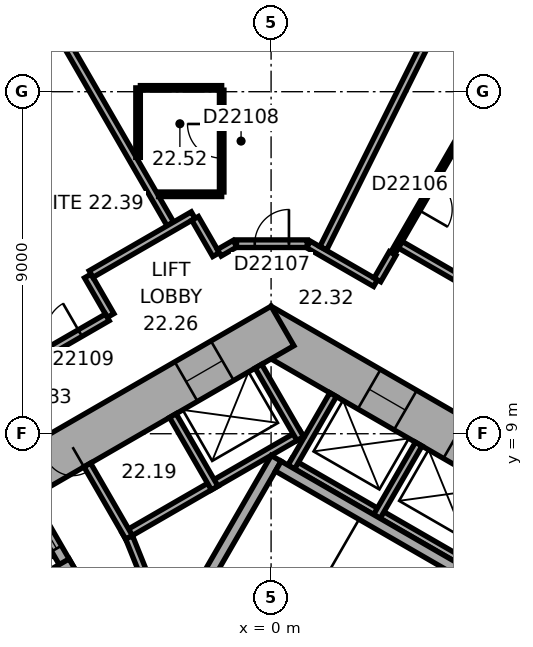
"""IFC4 building model, lengths in metres.
Left out: names, types, materials, properties, quantities, classifications, styles, units other than length and angle.
Written with IfcOpenShell. Run it as: python <this file> out.ifc"""

import sys

from ifc_helpers import new_model, si_unit, direction, frame, frame_2d, origin, place, context, subcontext, project, spatial, rectangle, extrude, element, fill, save


model = new_model("IFC4")
c1 = context("Model", 3, precision=1e-05, world=origin(), true_north=direction((0.0, 1.0)))
c2 = subcontext(c1, "Body", "Model", "MODEL_VIEW")
j1 = project(units=[si_unit("LENGTHUNIT", "METRE"), si_unit("PLANEANGLEUNIT", "RADIAN")], contexts=[c1])
p1 = place(None, origin())
s1 = spatial("IfcSite", under=j1, at=p1, CompositionType="ELEMENT")
p2 = place(p1, origin())
s2 = spatial("IfcBuilding", under=s1, at=p2, CompositionType="ELEMENT")
p3 = place(p2, frame((0.0, 0.0, 96.8)))
s3 = spatial("IfcBuildingStorey", under=s2, at=p3, CompositionType="ELEMENT", Elevation=96.8)
p4 = place(p3, frame((10.4, 5.658, 0.0), z_axis=(0.0, 0.0, 1.0), x_axis=(-0.866021384402, 0.500006961711, 0.0)))
e1 = element("IfcWall", 1, at=p4, inside=s3, PredefinedType="SHEAR", context=c2, shape_type="SweptSolid", body=[
    extrude(rectangle(XDim=12.355, YDim=1.2, at=frame_2d((6.178, 0.0))), origin(), (0.0, 0.0, 1.0), 3.3),
])
p5 = place(p4, frame((2.728, 0.0, 0.0)))
e2 = element("IfcOpeningElement", 2, at=p5, cuts=e1, PredefinedType="OPENING", context=c2, shape_type="SweptSolid", body=[
    extrude(rectangle(XDim=1.1, YDim=2.1, at=frame_2d((0.55, 1.05))), frame((0.0, 0.61, 0.0), z_axis=(0.0, -1.0, 0.0), x_axis=(1.0, 0.0, 0.0)), (0.0, 0.0, 1.0), 1.22),
])
p6 = place(p4, frame((5.328, 0.0, 0.0)))
e3 = element("IfcOpeningElement", 3, at=p6, cuts=e1, PredefinedType="OPENING", context=c2, shape_type="SweptSolid", body=[
    extrude(rectangle(XDim=1.1, YDim=2.1, at=frame_2d((0.55, 1.05))), frame((0.0, 0.61, 0.0), z_axis=(0.0, -1.0, 0.0), x_axis=(1.0, 0.0, 0.0)), (0.0, 0.0, 1.0), 1.22),
])
p7 = place(p4, frame((7.928, 0.0, 0.0)))
e4 = element("IfcOpeningElement", 4, at=p7, cuts=e1, PredefinedType="OPENING", context=c2, shape_type="SweptSolid", body=[
    extrude(rectangle(XDim=1.1, YDim=2.1, at=frame_2d((0.55, 1.05))), frame((0.0, 0.61, 0.0), z_axis=(0.0, -1.0, 0.0), x_axis=(1.0, 0.0, 0.0)), (0.0, 0.0, 1.0), 1.22),
])
p8 = place(p3, frame((0.3, 11.836, 0.0), z_axis=(0.0, 0.0, 1.0), x_axis=(-0.866021384402, -0.500006961711, 0.0)))
e5 = element("IfcWall", 5, at=p8, inside=s3, PredefinedType="SHEAR", context=c2, shape_type="SweptSolid", body=[
    extrude(rectangle(XDim=12.355, YDim=1.2, at=frame_2d((6.178, 0.0))), origin(), (0.0, 0.0, 1.0), 3.3),
])
p9 = place(p8, frame((6.378, 0.0, 0.0)))
e6 = element("IfcOpeningElement", 6, at=p9, cuts=e5, PredefinedType="OPENING", context=c2, shape_type="SweptSolid", body=[
    extrude(rectangle(XDim=1.5, YDim=2.1, at=frame_2d((0.75, 1.05))), frame((0.0, 0.61, 0.0), z_axis=(0.0, -1.0, 0.0), x_axis=(1.0, 0.0, 0.0)), (0.0, 0.0, 1.0), 1.22),
])
p10 = place(p8, frame((1.828, 0.0, 0.0)))
e7 = element("IfcOpeningElement", 7, at=p10, cuts=e5, PredefinedType="OPENING", context=c2, shape_type="SweptSolid", body=[
    extrude(rectangle(XDim=1.1, YDim=2.1, at=frame_2d((0.55, 1.05))), frame((0.0, 0.61, 0.0), z_axis=(0.0, -1.0, 0.0), x_axis=(1.0, 0.0, 0.0)), (0.0, 0.0, 1.0), 1.22),
])
p11 = place(p3, frame((20.63, 15.47, 0.0), z_axis=(0.0, 0.0, 1.0), x_axis=(-0.894934518609, 0.446197498203, 0.0)))
e8 = element("IfcWall", 8, at=p11, inside=s3, PredefinedType="STANDARD", context=c2, shape_type="SweptSolid", body=[
    extrude(rectangle(XDim=21.246, YDim=0.2, at=frame_2d((10.623, 0.0))), origin(), (0.0, 0.0, 1.0), 3.3),
])
p12 = place(p11, frame((1.553, 0.0, 0.8)))
e9 = element("IfcOpeningElement", 9, at=p12, cuts=e8, PredefinedType="OPENING", context=c2, shape_type="SweptSolid", body=[
    extrude(rectangle(XDim=2.4, YDim=1.7, at=frame_2d((1.2, 0.85))), frame((0.0, 0.11, 0.0), z_axis=(0.0, -1.0, 0.0), x_axis=(1.0, 0.0, 0.0)), (0.0, 0.0, 1.0), 0.22),
])
p13 = place(p11, frame((5.488, 0.0, 0.8)))
e10 = element("IfcOpeningElement", 10, at=p13, cuts=e8, PredefinedType="OPENING", context=c2, shape_type="SweptSolid", body=[
    extrude(rectangle(XDim=2.4, YDim=1.7, at=frame_2d((1.2, 0.85))), frame((0.0, 0.11, 0.0), z_axis=(0.0, -1.0, 0.0), x_axis=(1.0, 0.0, 0.0)), (0.0, 0.0, 1.0), 0.22),
])
p14 = place(p11, frame((9.422, 0.0, 0.8)))
e11 = element("IfcOpeningElement", 11, at=p14, cuts=e8, PredefinedType="OPENING", context=c2, shape_type="SweptSolid", body=[
    extrude(rectangle(XDim=2.4, YDim=1.7, at=frame_2d((1.2, 0.85))), frame((0.0, 0.11, 0.0), z_axis=(0.0, -1.0, 0.0), x_axis=(1.0, 0.0, 0.0)), (0.0, 0.0, 1.0), 0.22),
])
p15 = place(p11, frame((13.357, 0.0, 0.8)))
e12 = element("IfcOpeningElement", 12, at=p15, cuts=e8, PredefinedType="OPENING", context=c2, shape_type="SweptSolid", body=[
    extrude(rectangle(XDim=2.4, YDim=1.7, at=frame_2d((1.2, 0.85))), frame((0.0, 0.11, 0.0), z_axis=(0.0, -1.0, 0.0), x_axis=(1.0, 0.0, 0.0)), (0.0, 0.0, 1.0), 0.22),
])
p16 = place(p11, frame((17.292, 0.0, 0.8)))
e13 = element("IfcOpeningElement", 13, at=p16, cuts=e8, PredefinedType="OPENING", context=c2, shape_type="SweptSolid", body=[
    extrude(rectangle(XDim=2.4, YDim=1.7, at=frame_2d((1.2, 0.85))), frame((0.0, 0.11, 0.0), z_axis=(0.0, -1.0, 0.0), x_axis=(1.0, 0.0, 0.0)), (0.0, 0.0, 1.0), 0.22),
])
p17 = place(p3, frame((-3.136, 24.805, 0.0), z_axis=(0.0, 0.0, 1.0), x_axis=(-0.866028291626, -0.499994998079, 0.0)))
e14 = element("IfcWall", 14, at=p17, inside=s3, PredefinedType="STANDARD", context=c2, shape_type="SweptSolid", body=[
    extrude(rectangle(XDim=21.246, YDim=0.2, at=frame_2d((10.623, 0.0))), origin(), (0.0, 0.0, 1.0), 3.3),
])
p18 = place(p17, frame((1.555, 0.0, 0.8)))
e15 = element("IfcOpeningElement", 15, at=p18, cuts=e14, PredefinedType="OPENING", context=c2, shape_type="SweptSolid", body=[
    extrude(rectangle(XDim=2.4, YDim=1.7, at=frame_2d((1.2, 0.85))), frame((0.0, 0.11, 0.0), z_axis=(0.0, -1.0, 0.0), x_axis=(1.0, 0.0, 0.0)), (0.0, 0.0, 1.0), 0.22),
])
p19 = place(p17, frame((5.489, 0.0, 0.8)))
e16 = element("IfcOpeningElement", 16, at=p19, cuts=e14, PredefinedType="OPENING", context=c2, shape_type="SweptSolid", body=[
    extrude(rectangle(XDim=2.4, YDim=1.7, at=frame_2d((1.2, 0.85))), frame((0.0, 0.11, 0.0), z_axis=(0.0, -1.0, 0.0), x_axis=(1.0, 0.0, 0.0)), (0.0, 0.0, 1.0), 0.22),
])
p20 = place(p17, frame((9.424, 0.0, 0.8)))
e17 = element("IfcOpeningElement", 17, at=p20, cuts=e14, PredefinedType="OPENING", context=c2, shape_type="SweptSolid", body=[
    extrude(rectangle(XDim=2.4, YDim=1.7, at=frame_2d((1.2, 0.85))), frame((0.0, 0.11, 0.0), z_axis=(0.0, -1.0, 0.0), x_axis=(1.0, 0.0, 0.0)), (0.0, 0.0, 1.0), 0.22),
])
p21 = place(p17, frame((13.358, 0.0, 0.8)))
e18 = element("IfcOpeningElement", 18, at=p21, cuts=e14, PredefinedType="OPENING", context=c2, shape_type="SweptSolid", body=[
    extrude(rectangle(XDim=2.4, YDim=1.7, at=frame_2d((1.2, 0.85))), frame((0.0, 0.11, 0.0), z_axis=(0.0, -1.0, 0.0), x_axis=(1.0, 0.0, 0.0)), (0.0, 0.0, 1.0), 0.22),
])
p22 = place(p17, frame((17.293, 0.0, 0.8)))
e19 = element("IfcOpeningElement", 19, at=p22, cuts=e14, PredefinedType="OPENING", context=c2, shape_type="SweptSolid", body=[
    extrude(rectangle(XDim=2.4, YDim=1.7, at=frame_2d((1.2, 0.85))), frame((0.0, 0.11, 0.0), z_axis=(0.0, -1.0, 0.0), x_axis=(1.0, 0.0, 0.0)), (0.0, 0.0, 1.0), 0.22),
])
p23 = place(p3, frame((7.424, 4.259, 0.0), z_axis=(0.0, 0.0, 1.0), x_axis=(-0.866026010844, 0.49999894854, 0.0)))
e20 = element("IfcWall", 20, at=p23, inside=s3, PredefinedType="PARTITIONING", context=c2, shape_type="SweptSolid", body=[
    extrude(rectangle(XDim=8.0, YDim=0.2, at=frame_2d((4.0, 0.0))), origin(), (0.0, 0.0, 1.0), 3.05),
])
for number, where, z_axis, x_axis in (
    (21, (2.784, 6.822, 0.0), (0.0, 0.0, 1.0), (0.5, 0.866, 0.0)),
    (22, (0.532, 8.122, 0.0), (0.0, 0.0, 1.0), (0.5, 0.866, 0.0)),
):
    element("IfcWall", number, at=place(p3, frame(where, z_axis=z_axis, x_axis=x_axis)), inside=s3, PredefinedType="PARTITIONING", context=c2, shape_type="SweptSolid", body=[
        extrude(rectangle(XDim=2.2, YDim=0.2, at=frame_2d((1.1, 0.0))), origin(), (0.0, 0.0, 1.0), 3.05),
    ])
p24 = place(p3, frame((0.803, 9.009, 0.0), z_axis=(0.0, 0.0, 1.0), x_axis=(-0.866028230842, -0.499995103361, 0.0)))
e23 = element("IfcWall", 23, at=p24, inside=s3, PredefinedType="PARTITIONING", context=c2, shape_type="SweptSolid", body=[
    extrude(rectangle(XDim=5.4, YDim=0.2, at=frame_2d((2.7, 0.0))), origin(), (0.0, 0.0, 1.0), 3.05),
])
p25 = place(p3, frame((0.767, 8.872, 0.0), z_axis=(0.0, 0.0, 1.0), x_axis=(-0.499994660107, 0.866028486751, 0.0)))
e24 = element("IfcWall", 24, at=p25, inside=s3, PredefinedType="PARTITIONING", context=c2, shape_type="SweptSolid", body=[
    extrude(rectangle(XDim=2.2, YDim=0.2, at=frame_2d((1.1, 0.0))), origin(), (0.0, 0.0, 1.0), 3.05),
])
for number, where, z_axis, x_axis in (
    (25, (-1.485, 7.572, 0.0), (0.0, 0.0, 1.0), (-0.5, 0.866, 0.0)),
    (26, (-3.737, 6.272, 0.0), (0.0, 0.0, 1.0), (-0.5, 0.866, 0.0)),
):
    element("IfcWall", number, at=place(p3, frame(where, z_axis=z_axis, x_axis=x_axis)), inside=s3, PredefinedType="PARTITIONING", context=c2, shape_type="SweptSolid", body=[
        extrude(rectangle(XDim=2.2, YDim=0.2, at=frame_2d((1.1, 0.0))), origin(), (0.0, 0.0, 1.0), 3.05),
    ])
p26 = place(p3, frame((-2.216, 4.282, 0.0), z_axis=(0.0, 0.0, 1.0), x_axis=(0.499977259774, 0.866038532462, 0.0)))
e27 = element("IfcWall", 27, at=p26, inside=s3, PredefinedType="SHEAR", context=c2, shape_type="SweptSolid", body=[
    extrude(rectangle(XDim=4.7, YDim=0.3, at=frame_2d((2.35, 0.0))), origin(), (0.0, 0.0, 1.0), 3.05),
])
p27 = place(p3, frame((6.303, 4.617, 0.0), z_axis=(0.0, 0.0, 1.0), x_axis=(-0.866027801685, 0.499995846692, 0.0)))
e28 = element("IfcWall", 28, at=p27, inside=s3, PredefinedType="SHEAR", context=c2, shape_type="SweptSolid", body=[
    extrude(rectangle(XDim=7.06, YDim=0.3, at=frame_2d((3.53, 0.0))), origin(), (0.0, 0.0, 1.0), 3.05),
])
p28 = place(p3, frame((-5.295, 5.372, 0.0), z_axis=(0.0, 0.0, 1.0), x_axis=(-0.500077893725, 0.86598042715, 0.0)))
e29 = element("IfcWall", 29, at=p28, inside=s3, PredefinedType="SHEAR", context=c2, shape_type="SweptSolid", body=[
    extrude(rectangle(XDim=2.2, YDim=0.3, at=frame_2d((1.1, 0.0))), origin(), (0.0, 0.0, 1.0), 3.05),
])
p29 = place(p28, frame((0.7, 0.0, 0.0)))
e30 = element("IfcOpeningElement", 30, at=p29, cuts=e29, PredefinedType="OPENING", context=c2, shape_type="SweptSolid", body=[
    extrude(rectangle(XDim=1.1, YDim=2.1, at=frame_2d((0.55, 1.05))), frame((0.0, 0.16, 0.0), z_axis=(0.0, -1.0, 0.0), x_axis=(1.0, 0.0, 0.0)), (0.0, 0.0, 1.0), 0.32),
])
p30 = place(p3, frame((-5.24, 5.577, 0.0), z_axis=(0.0, 0.0, 1.0), x_axis=(-0.866014461049, -0.500018952895, 0.0)))
e31 = element("IfcWall", 31, at=p30, inside=s3, PredefinedType="SHEAR", context=c2, shape_type="SweptSolid", body=[
    extrude(rectangle(XDim=3.35, YDim=0.3, at=frame_2d((1.675, 0.0))), origin(), (0.0, 0.0, 1.0), 3.05),
])
p31 = place(p3, frame((-2.615, 3.487, 0.0), z_axis=(0.0, 0.0, 1.0), x_axis=(-0.373576831041, 0.92759924068, 0.0)))
e32 = element("IfcWall", 32, at=p31, inside=s3, PredefinedType="PARTITIONING", context=c2, shape_type="SweptSolid", body=[
    extrude(rectangle(XDim=3.002, YDim=0.2, at=frame_2d((1.501, 0.0))), origin(), (0.0, 0.0, 1.0), 3.05),
])
p32 = place(p31, frame((1.15, 0.0, 0.0)))
e33 = element("IfcOpeningElement", 33, at=p32, cuts=e32, PredefinedType="OPENING", context=c2, shape_type="SweptSolid", body=[
    extrude(rectangle(XDim=0.9, YDim=2.1, at=frame_2d((0.45, 1.05))), frame((0.0, 0.11, 0.0), z_axis=(0.0, -1.0, 0.0), x_axis=(1.0, 0.0, 0.0)), (0.0, 0.0, 1.0), 0.22),
])
p33 = place(p3, frame((-6.676, 21.492, 0.0), z_axis=(0.0, 0.0, 1.0), x_axis=(0.500011263043, -0.866018900966, 0.0)))
e34 = element("IfcWall", 34, at=p33, inside=s3, PredefinedType="PARTITIONING", context=c2, shape_type="SweptSolid", body=[
    extrude(rectangle(XDim=8.049, YDim=0.2, at=frame_2d((4.024, 0.0))), origin(), (0.0, 0.0, 1.0), 3.05),
])
p34 = place(p3, frame((-4.823, 13.152, 0.0), z_axis=(0.0, 0.0, 1.0), x_axis=(0.499986357472, -0.866033280158, 0.0)))
e35 = element("IfcWall", 35, at=p34, inside=s3, PredefinedType="PARTITIONING", context=c2, shape_type="SweptSolid", body=[
    extrude(rectangle(XDim=1.201, YDim=0.2, at=frame_2d((0.601, 0.0))), origin(), (0.0, 0.0, 1.0), 3.05),
])
p35 = place(p3, frame((-4.309, 12.061, 0.0), z_axis=(0.0, 0.0, 1.0), x_axis=(-0.866020679205, -0.500008183122, 0.0)))
e36 = element("IfcWall", 36, at=p35, inside=s3, PredefinedType="PARTITIONING", context=c2, shape_type="SweptSolid", body=[
    extrude(rectangle(XDim=5.104, YDim=0.2, at=frame_2d((2.552, 0.0))), origin(), (0.0, 0.0, 1.0), 3.05),
])
p36 = place(p35, frame((0.827, 0.0, 0.0)))
e37 = element("IfcOpeningElement", 37, at=p36, cuts=e36, PredefinedType="OPENING", context=c2, shape_type="SweptSolid", body=[
    extrude(rectangle(XDim=0.9, YDim=2.1, at=frame_2d((0.45, 1.05))), frame((0.0, 0.11, 0.0), z_axis=(0.0, -1.0, 0.0), x_axis=(1.0, 0.0, 0.0)), (0.0, 0.0, 1.0), 0.22),
])
p37 = place(p3, frame((-3.5, 16.271, 0.0), z_axis=(0.0, 0.0, 1.0), x_axis=(0.0, 1.0, 0.0)))
e38 = element("IfcWall", 38, at=p37, inside=s3, PredefinedType="PARTITIONING", context=c2, shape_type="SweptSolid", body=[
    extrude(rectangle(XDim=1.829, YDim=0.12, at=frame_2d((0.915, 0.0))), origin(), (0.0, 0.0, 1.0), 3.05),
])
p38 = place(p3, frame((-3.44, 18.101, 0.0), z_axis=(0.0, 0.0, 1.0), x_axis=(1.0, 0.0, 0.0)))
e39 = element("IfcWall", 39, at=p38, inside=s3, PredefinedType="PARTITIONING", context=c2, shape_type="SweptSolid", body=[
    extrude(rectangle(XDim=2.14, YDim=0.12, at=frame_2d((1.07, 0.0))), origin(), (0.0, 0.0, 1.0), 3.05),
])
p39 = place(p3, frame((-2.05, 14.752, 0.0), z_axis=(0.0, 0.0, 1.0), x_axis=(-0.866030936828, -0.499990416364, 0.0)))
e40 = element("IfcWall", 40, at=p39, inside=s3, PredefinedType="PARTITIONING", context=c2, shape_type="SweptSolid", body=[
    extrude(rectangle(XDim=3.102, YDim=0.2, at=frame_2d((1.551, 0.0))), origin(), (0.0, 0.0, 1.0), 3.05),
])
p40 = place(p3, frame((-1.449, 13.712, 0.0), z_axis=(0.0, 0.0, 1.0), x_axis=(-0.499978356969, 0.866037899034, 0.0)))
e41 = element("IfcWall", 41, at=p40, inside=s3, PredefinedType="PARTITIONING", context=c2, shape_type="SweptSolid", body=[
    extrude(rectangle(XDim=1.101, YDim=0.2, at=frame_2d((0.551, 0.0))), origin(), (0.0, 0.0, 1.0), 3.05),
])
p41 = place(p3, frame((-1.3, 15.301, 0.0), z_axis=(0.0, 0.0, 1.0), x_axis=(-1.0, 0.0, 0.0)))
e42 = element("IfcWall", 42, at=p41, inside=s3, PredefinedType="PARTITIONING", context=c2, shape_type="SweptSolid", body=[
    extrude(rectangle(XDim=1.661, YDim=0.12, at=frame_2d((0.831, 0.0))), origin(), (0.0, 0.0, 1.0), 3.05),
])
p42 = place(p3, frame((-1.3, 18.041, 0.0), z_axis=(0.0, 0.0, 1.0), x_axis=(0.0, -1.0, 0.0)))
e43 = element("IfcWall", 43, at=p42, inside=s3, PredefinedType="PARTITIONING", context=c2, shape_type="SweptSolid", body=[
    extrude(rectangle(XDim=2.68, YDim=0.12, at=frame_2d((1.34, 0.0))), origin(), (0.0, 0.0, 1.0), 3.05),
])
p43 = place(p42, frame((0.89, 0.0, 0.0)))
e44 = element("IfcOpeningElement", 44, at=p43, cuts=e43, PredefinedType="OPENING", context=c2, shape_type="SweptSolid", body=[
    extrude(rectangle(XDim=0.9, YDim=2.1, at=frame_2d((0.45, 1.05))), frame((0.0, 0.07, 0.0), z_axis=(0.0, -1.0, 0.0), x_axis=(1.0, 0.0, 0.0)), (0.0, 0.0, 1.0), 0.14),
])
p44 = place(p3, frame((-0.95, 14.001, 0.0), z_axis=(0.0, 0.0, 1.0), x_axis=(-0.86609177584, -0.499885022602, 0.0)))
e45 = element("IfcWall", 45, at=p44, inside=s3, PredefinedType="PARTITIONING", context=c2, shape_type="SweptSolid", body=[
    extrude(rectangle(XDim=0.477, YDim=0.2, at=frame_2d((0.238, 0.0))), origin(), (0.0, 0.0, 1.0), 3.05),
])
p45 = place(p3, frame((0.95, 14.001, 0.0), z_axis=(0.0, 0.0, 1.0), x_axis=(-1.0, 0.0, 0.0)))
e46 = element("IfcWall", 46, at=p45, inside=s3, PredefinedType="PARTITIONING", context=c2, shape_type="SweptSolid", body=[
    extrude(rectangle(XDim=1.86, YDim=0.2, at=frame_2d((0.93, 0.0))), origin(), (0.0, 0.0, 1.0), 3.05),
])
p46 = place(p45, frame((0.48, 0.0, 0.0)))
e47 = element("IfcOpeningElement", 47, at=p46, cuts=e46, PredefinedType="OPENING", context=c2, shape_type="SweptSolid", body=[
    extrude(rectangle(XDim=0.9, YDim=2.1, at=frame_2d((0.45, 1.05))), frame((0.0, 0.11, 0.0), z_axis=(0.0, -1.0, 0.0), x_axis=(1.0, 0.0, 0.0)), (0.0, 0.0, 1.0), 0.22),
])
p47 = place(p3, frame((2.748, 12.962, 0.0), z_axis=(0.0, 0.0, 1.0), x_axis=(-0.866013897511, 0.50001992892, 0.0)))
e48 = element("IfcWall", 48, at=p47, inside=s3, PredefinedType="PARTITIONING", context=c2, shape_type="SweptSolid", body=[
    extrude(rectangle(XDim=2.037, YDim=0.2, at=frame_2d((1.018, 0.0))), origin(), (0.0, 0.0, 1.0), 3.05),
])
p48 = place(p3, frame((3.199, 13.743, 0.0), z_axis=(0.0, 0.0, 1.0), x_axis=(-0.500170954823, -0.865926680471, 0.0)))
e49 = element("IfcWall", 49, at=p48, inside=s3, PredefinedType="PARTITIONING", context=c2, shape_type="SweptSolid", body=[
    extrude(rectangle(XDim=0.801, YDim=0.2, at=frame_2d((0.4, 0.0))), origin(), (0.0, 0.0, 1.0), 3.05),
])
p49 = place(p3, frame((3.232, 13.8, 0.0), z_axis=(0.0, 0.0, 1.0), x_axis=(0.499993265928, 0.866029291668, 0.0)))
e50 = element("IfcWall", 50, at=p49, inside=s3, PredefinedType="PARTITIONING", context=c2, shape_type="SweptSolid", body=[
    extrude(rectangle(XDim=3.434, YDim=0.12, at=frame_2d((1.717, 0.0))), origin(), (0.0, 0.0, 1.0), 3.05),
])
p50 = place(p49, frame((1.267, 0.0, 0.0)))
e51 = element("IfcOpeningElement", 51, at=p50, cuts=e50, PredefinedType="OPENING", context=c2, shape_type="SweptSolid", body=[
    extrude(rectangle(XDim=0.9, YDim=2.1, at=frame_2d((0.45, 1.05))), frame((0.0, 0.07, 0.0), z_axis=(0.0, -1.0, 0.0), x_axis=(1.0, 0.0, 0.0)), (0.0, 0.0, 1.0), 0.14),
])
p51 = place(p3, frame((5.351, 21.859, 0.0), z_axis=(0.0, 0.0, 1.0), x_axis=(-0.446205309328, -0.894930624086, 0.0)))
e52 = element("IfcWall", 52, at=p51, inside=s3, PredefinedType="PARTITIONING", context=c2, shape_type="SweptSolid", body=[
    extrude(rectangle(XDim=8.913, YDim=0.2, at=frame_2d((4.457, 0.0))), origin(), (0.0, 0.0, 1.0), 2.6),
])
p52 = place(p3, frame((10.885, 9.652, 0.0), z_axis=(0.0, 0.0, 1.0), x_axis=(-0.866033630405, 0.499985750804, 0.0)))
e53 = element("IfcWall", 53, at=p52, inside=s3, PredefinedType="PARTITIONING", context=c2, shape_type="SweptSolid", body=[
    extrude(rectangle(XDim=8.642, YDim=0.2, at=frame_2d((4.321, 0.0))), origin(), (0.0, 0.0, 1.0), 3.05),
])
p53 = place(p52, frame((2.276, 0.0, 0.0)))
e54 = element("IfcOpeningElement", 54, at=p53, cuts=e53, PredefinedType="OPENING", context=c2, shape_type="SweptSolid", body=[
    extrude(rectangle(XDim=0.9, YDim=2.1, at=frame_2d((0.45, 1.05))), frame((0.0, 0.11, 0.0), z_axis=(0.0, -1.0, 0.0), x_axis=(1.0, 0.0, 0.0)), (0.0, 0.0, 1.0), 0.22),
])
p54 = place(p9, origin())
e55 = element("IfcDoor", 55, at=p54, inside=s3, OperationType="DOUBLE_DOOR_SINGLE_SWING", PredefinedType="DOOR", context=c2, shape_type="SweptSolid", body=[
    extrude(rectangle(XDim=1.5, YDim=2.1, at=frame_2d((0.75, 1.05))), frame((0.0, 0.025, 0.0), z_axis=(0.0, -1.0, 0.0), x_axis=(1.0, 0.0, 0.0)), (0.0, 0.0, 1.0), 0.05),
])
fill(e6, e55)
p55 = place(p29, origin())
e56 = element("IfcDoor", 56, at=p55, inside=s3, OperationType="DOUBLE_DOOR_SLIDING", PredefinedType="DOOR", context=c2, shape_type="SweptSolid", body=[
    extrude(rectangle(XDim=1.1, YDim=2.1, at=frame_2d((0.55, 1.05))), frame((0.0, 0.025, 0.0), z_axis=(0.0, -1.0, 0.0), x_axis=(1.0, 0.0, 0.0)), (0.0, 0.0, 1.0), 0.05),
])
fill(e30, e56)
p56 = place(p7, origin())
e57 = element("IfcDoor", 57, at=p56, inside=s3, OperationType="DOUBLE_DOOR_SLIDING", PredefinedType="DOOR", context=c2, shape_type="SweptSolid", body=[
    extrude(rectangle(XDim=1.1, YDim=2.1, at=frame_2d((0.55, 1.05))), frame((0.0, 0.025, 0.0), z_axis=(0.0, -1.0, 0.0), x_axis=(1.0, 0.0, 0.0)), (0.0, 0.0, 1.0), 0.05),
])
fill(e4, e57)
p57 = place(p10, origin())
e58 = element("IfcDoor", 58, at=p57, inside=s3, OperationType="DOUBLE_DOOR_SLIDING", PredefinedType="DOOR", context=c2, shape_type="SweptSolid", body=[
    extrude(rectangle(XDim=1.1, YDim=2.1, at=frame_2d((0.55, 1.05))), frame((0.0, 0.025, 0.0), z_axis=(0.0, -1.0, 0.0), x_axis=(1.0, 0.0, 0.0)), (0.0, 0.0, 1.0), 0.05),
])
fill(e7, e58)
p58 = place(p50, origin())
e59 = element("IfcDoor", 59, at=p58, inside=s3, OperationType="SINGLE_SWING_LEFT", PredefinedType="DOOR", context=c2, shape_type="SweptSolid", body=[
    extrude(rectangle(XDim=0.9, YDim=2.1, at=frame_2d((0.45, 1.05))), frame((0.0, 0.025, 0.0), z_axis=(0.0, -1.0, 0.0), x_axis=(1.0, 0.0, 0.0)), (0.0, 0.0, 1.0), 0.05),
])
fill(e51, e59)
p59 = place(p46, origin())
e60 = element("IfcDoor", 60, at=p59, inside=s3, OperationType="SINGLE_SWING_LEFT", PredefinedType="DOOR", context=c2, shape_type="SweptSolid", body=[
    extrude(rectangle(XDim=0.9, YDim=2.1, at=frame_2d((0.45, 1.05))), frame((0.0, 0.025, 0.0), z_axis=(0.0, -1.0, 0.0), x_axis=(1.0, 0.0, 0.0)), (0.0, 0.0, 1.0), 0.05),
])
fill(e47, e60)
p60 = place(p43, origin())
e61 = element("IfcDoor", 61, at=p60, inside=s3, OperationType="SINGLE_SWING_LEFT", PredefinedType="DOOR", context=c2, shape_type="SweptSolid", body=[
    extrude(rectangle(XDim=0.9, YDim=2.1, at=frame_2d((0.45, 1.05))), frame((0.0, 0.025, 0.0), z_axis=(0.0, -1.0, 0.0), x_axis=(1.0, 0.0, 0.0)), (0.0, 0.0, 1.0), 0.05),
])
fill(e44, e61)
p61 = place(p36, origin())
e62 = element("IfcDoor", 62, at=p61, inside=s3, OperationType="SINGLE_SWING_LEFT", PredefinedType="DOOR", context=c2, shape_type="SweptSolid", body=[
    extrude(rectangle(XDim=0.9, YDim=2.1, at=frame_2d((0.45, 1.05))), frame((0.0, 0.025, 0.0), z_axis=(0.0, -1.0, 0.0), x_axis=(1.0, 0.0, 0.0)), (0.0, 0.0, 1.0), 0.05),
])
fill(e37, e62)
save(model, sys.argv[1])
